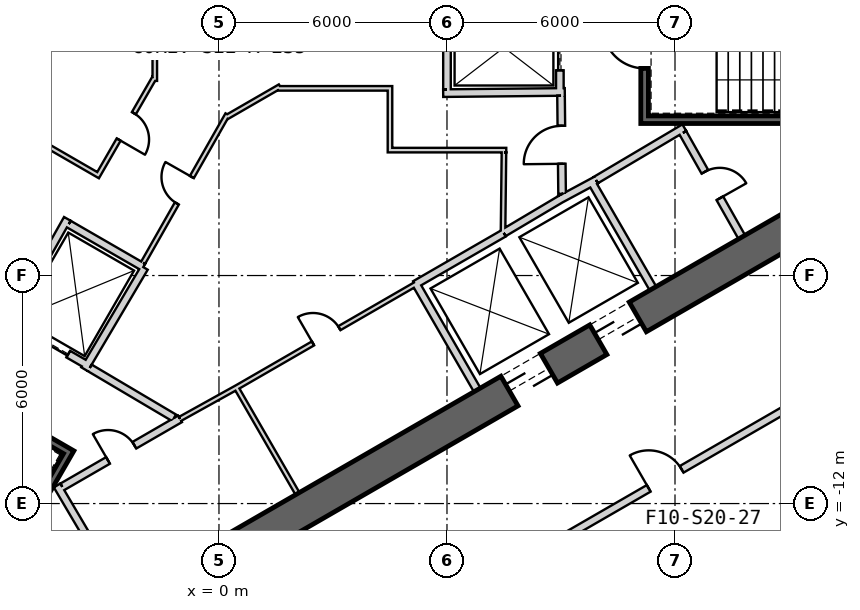
"""IFC4 building model, lengths in metres.
Left out: names, types, materials, properties, quantities, classifications, styles, units other than length and angle.
Written with IfcOpenShell. Run it as: python <this file> out.ifc"""

import sys

from ifc_helpers import new_model, si_unit, direction, frame, frame_2d, origin, place, context, subcontext, project, spatial, rectangle, extrude, element, fill, save


model = new_model("IFC4")
c1 = context("Model", 3, precision=1e-05, world=origin(), true_north=direction((0.0, 1.0)))
c2 = subcontext(c1, "Body", "Model", "MODEL_VIEW")
j1 = project(units=[si_unit("LENGTHUNIT", "METRE"), si_unit("PLANEANGLEUNIT", "RADIAN")], contexts=[c1])
p1 = place(None, origin())
s1 = spatial("IfcSite", under=j1, at=p1, CompositionType="ELEMENT")
p2 = place(p1, origin())
s2 = spatial("IfcBuilding", under=s1, at=p2, CompositionType="ELEMENT")
p3 = place(p2, frame((0.0, 0.0, 322.1)))
s3 = spatial("IfcBuildingStorey", under=s2, at=p3, CompositionType="ELEMENT", Elevation=322.1)
p4 = place(p3, frame((-7.825, -17.97, 0.0), z_axis=(0.0, 0.0, 1.0), x_axis=(0.866028369851, 0.499994862586, 0.0)))
e1 = element("IfcWall", 1, at=p4, inside=s3, PredefinedType="SHEAR", context=c2, shape_type="SweptSolid", body=[
    extrude(rectangle(XDim=31.523, YDim=0.9, at=frame_2d((15.762, 0.0))), origin(), (0.0, 0.0, 1.0), 3.9),
])
p5 = place(p4, frame((17.862, 0.0, 0.0)))
e2 = element("IfcOpeningElement", 2, at=p5, cuts=e1, PredefinedType="OPENING", context=c2, shape_type="SweptSolid", body=[
    extrude(rectangle(XDim=1.2, YDim=2.4, at=frame_2d((0.6, 1.2))), frame((0.0, 0.46, 0.0), z_axis=(0.0, -1.0, 0.0), x_axis=(1.0, 0.0, 0.0)), (0.0, 0.0, 1.0), 0.92),
])
p6 = place(p4, frame((20.562, 0.0, 0.0)))
e3 = element("IfcOpeningElement", 3, at=p6, cuts=e1, PredefinedType="OPENING", context=c2, shape_type="SweptSolid", body=[
    extrude(rectangle(XDim=1.2, YDim=2.4, at=frame_2d((0.6, 1.2))), frame((0.0, 0.46, 0.0), z_axis=(0.0, -1.0, 0.0), x_axis=(1.0, 0.0, 0.0)), (0.0, 0.0, 1.0), 0.92),
])
p7 = place(p4, frame((26.712, 0.0, 0.0)))
e4 = element("IfcOpeningElement", 4, at=p7, cuts=e1, PredefinedType="OPENING", context=c2, shape_type="SweptSolid", body=[
    extrude(rectangle(XDim=1.2, YDim=2.4, at=frame_2d((0.6, 1.2))), frame((0.0, 0.46, 0.0), z_axis=(0.0, -1.0, 0.0), x_axis=(1.0, 0.0, 0.0)), (0.0, 0.0, 1.0), 0.92),
])
p8 = place(p4, frame((3.612, 0.0, 0.0)))
e5 = element("IfcOpeningElement", 5, at=p8, cuts=e1, PredefinedType="OPENING", context=c2, shape_type="SweptSolid", body=[
    extrude(rectangle(XDim=1.2, YDim=2.4, at=frame_2d((0.6, 1.2))), frame((0.0, 0.46, 0.0), z_axis=(0.0, -1.0, 0.0), x_axis=(1.0, 0.0, 0.0)), (0.0, 0.0, 1.0), 0.92),
])
p9 = place(p3, frame((6.795, -9.01, 0.0), z_axis=(0.0, 0.0, 1.0), x_axis=(-0.499984717929, 0.866034226713, 0.0)))
e6 = element("IfcWall", 6, at=p9, inside=s3, PredefinedType="PLUMBINGWALL", context=c2, shape_type="SweptSolid", body=[
    extrude(rectangle(XDim=3.25, YDim=0.2, at=frame_2d((1.625, 0.0))), origin(), (0.0, 0.0, 1.0), 3.6),
])
p10 = place(p3, frame((5.159, -6.236, 0.0), z_axis=(0.0, 0.0, 1.0), x_axis=(0.866036505625, 0.499980770555, 0.0)))
e7 = element("IfcWall", 7, at=p10, inside=s3, PredefinedType="PLUMBINGWALL", context=c2, shape_type="SweptSolid", body=[
    extrude(rectangle(XDim=2.7, YDim=0.2, at=frame_2d((1.35, 0.0))), origin(), (0.0, 0.0, 1.0), 3.6),
])
p11 = place(p3, frame((9.795, -3.525, 0.0), z_axis=(0.0, 0.0, 1.0), x_axis=(0.499984717929, -0.866034226713, 0.0)))
e8 = element("IfcWall", 8, at=p11, inside=s3, PredefinedType="PLUMBINGWALL", context=c2, shape_type="SweptSolid", body=[
    extrude(rectangle(XDim=3.25, YDim=0.2, at=frame_2d((1.625, 0.0))), origin(), (0.0, 0.0, 1.0), 3.6),
])
p12 = place(p3, frame((8.974, -3.999, 0.0), z_axis=(0.0, 0.0, 1.0), x_axis=(0.880907015104, 0.473289373154, 0.0)))
e9 = element("IfcWall", 9, at=p12, inside=s3, PredefinedType="PLUMBINGWALL", context=c2, shape_type="SweptSolid", body=[
    extrude(rectangle(XDim=1.078, YDim=0.2, at=frame_2d((0.539, 0.0))), origin(), (0.0, 0.0, 1.0), 3.6),
])
p13 = place(p3, frame((7.493, -4.878, 0.0), z_axis=(0.0, 0.0, 1.0), x_axis=(0.859981807212, 0.510324691999, 0.0)))
e10 = element("IfcWall", 10, at=p13, inside=s3, PredefinedType="PLUMBINGWALL", context=c2, shape_type="SweptSolid", body=[
    extrude(rectangle(XDim=1.845, YDim=0.2, at=frame_2d((0.922, 0.0))), origin(), (0.0, 0.0, 1.0), 3.6),
])
p14 = place(p3, frame((11.1, -1.9, -0.3), z_axis=(0.0, 0.0, 1.0), x_axis=(1.0, 0.0, 0.0)))
e11 = element("IfcWall", 11, at=p14, inside=s3, PredefinedType="SHEAR", context=c2, shape_type="SweptSolid", body=[
    extrude(rectangle(XDim=7.9, YDim=0.2, at=frame_2d((3.95, 0.0))), origin(), (0.0, 0.0, 1.0), 3.9),
])
p15 = place(p3, frame((11.2, -1.8, -0.3), z_axis=(0.0, 0.0, 1.0), x_axis=(0.0, 1.0, 0.0)))
e12 = element("IfcWall", 12, at=p15, inside=s3, PredefinedType="SHEAR", context=c2, shape_type="SweptSolid", body=[
    extrude(rectangle(XDim=3.6, YDim=0.2, at=frame_2d((1.8, 0.0))), origin(), (0.0, 0.0, 1.0), 3.9),
])
p16 = place(p15, frame((1.25, 0.0, 0.3)))
e13 = element("IfcOpeningElement", 13, at=p16, cuts=e12, PredefinedType="OPENING", context=c2, shape_type="SweptSolid", body=[
    extrude(rectangle(XDim=1.1, YDim=2.1, at=frame_2d((0.55, 1.05))), frame((0.0, 0.11, 0.0), z_axis=(0.0, -1.0, 0.0), x_axis=(1.0, 0.0, 0.0)), (0.0, 0.0, 1.0), 0.22),
])
p17 = place(p3, frame((8.97, 1.2, 0.0), z_axis=(0.0, 0.0, 1.0), x_axis=(0.0, -1.0, 0.0)))
e14 = element("IfcWall", 14, at=p17, inside=s3, PredefinedType="PLUMBINGWALL", context=c2, shape_type="SweptSolid", body=[
    extrude(rectangle(XDim=2.4, YDim=0.2, at=frame_2d((1.2, 0.0))), origin(), (0.0, 0.0, 1.0), 3.6),
])
p18 = place(p17, frame((0.6, 0.0, 0.0)))
e15 = element("IfcOpeningElement", 15, at=p18, cuts=e14, PredefinedType="OPENING", context=c2, shape_type="SweptSolid", body=[
    extrude(rectangle(XDim=1.2, YDim=2.4, at=frame_2d((0.6, 1.2))), frame((0.0, 0.11, 0.0), z_axis=(0.0, -1.0, 0.0), x_axis=(1.0, 0.0, 0.0)), (0.0, 0.0, 1.0), 0.22),
])
p19 = place(p3, frame((5.9, -1.201, 0.0), z_axis=(0.0, 0.0, 1.0), x_axis=(0.999950064753, 0.009993397809, 0.0)))
e16 = element("IfcWall", 16, at=p19, inside=s3, PredefinedType="PLUMBINGWALL", context=c2, shape_type="SweptSolid", body=[
    extrude(rectangle(XDim=3.2, YDim=0.2, at=frame_2d((1.6, 0.0))), origin(), (0.0, 0.0, 1.0), 3.6),
])
p20 = place(p3, frame((6.0, -1.1, 0.0), z_axis=(0.0, 0.0, 1.0), x_axis=(0.0, 1.0, 0.0)))
e17 = element("IfcWall", 17, at=p20, inside=s3, PredefinedType="PLUMBINGWALL", context=c2, shape_type="SweptSolid", body=[
    extrude(rectangle(XDim=2.28, YDim=0.2, at=frame_2d((1.14, 0.0))), origin(), (0.0, 0.0, 1.0), 3.6),
])
p21 = place(p3, frame((-3.905, -10.563, -0.3), z_axis=(0.0, 0.0, 1.0), x_axis=(-0.500012932018, -0.866017937352, 0.0)))
e18 = element("IfcWall", 18, at=p21, inside=s3, PredefinedType="SHEAR", context=c2, shape_type="SweptSolid", body=[
    extrude(rectangle(XDim=8.1, YDim=0.2, at=frame_2d((4.05, 0.0))), origin(), (0.0, 0.0, 1.0), 3.9),
])
p22 = place(p3, frame((-4.041, -10.599, -0.3), z_axis=(0.0, 0.0, 1.0), x_axis=(-0.866047807691, 0.499961193289, 0.0)))
e19 = element("IfcWall", 19, at=p22, inside=s3, PredefinedType="SHEAR", context=c2, shape_type="SweptSolid", body=[
    extrude(rectangle(XDim=3.6, YDim=0.2, at=frame_2d((1.8, 0.0))), origin(), (0.0, 0.0, 1.0), 3.9),
])
p23 = place(p22, frame((1.25, 0.0, 0.3)))
e20 = element("IfcOpeningElement", 20, at=p23, cuts=e19, PredefinedType="OPENING", context=c2, shape_type="SweptSolid", body=[
    extrude(rectangle(XDim=1.1, YDim=2.1, at=frame_2d((0.55, 1.05))), frame((0.0, 0.11, 0.0), z_axis=(0.0, -1.0, 0.0), x_axis=(1.0, 0.0, 0.0)), (0.0, 0.0, 1.0), 0.22),
])
p24 = place(p3, frame((-3.446, -8.368, 0.0), z_axis=(0.0, 0.0, 1.0), x_axis=(-0.866024647952, 0.500001309137, 0.0)))
e21 = element("IfcWall", 21, at=p24, inside=s3, PredefinedType="PLUMBINGWALL", context=c2, shape_type="SweptSolid", body=[
    extrude(rectangle(XDim=2.4, YDim=0.2, at=frame_2d((1.2, 0.0))), origin(), (0.0, 0.0, 1.0), 3.6),
])
p25 = place(p24, frame((0.6, 0.0, 0.0)))
e22 = element("IfcOpeningElement", 22, at=p25, cuts=e21, PredefinedType="OPENING", context=c2, shape_type="SweptSolid", body=[
    extrude(rectangle(XDim=1.2, YDim=2.4, at=frame_2d((0.6, 1.2))), frame((0.0, 0.11, 0.0), z_axis=(0.0, -1.0, 0.0), x_axis=(1.0, 0.0, 0.0)), (0.0, 0.0, 1.0), 0.22),
])
p26 = place(p3, frame((-1.961, -5.796, 0.0), z_axis=(0.0, 0.0, 1.0), x_axis=(-0.508647062354, -0.860975125052, 0.0)))
e23 = element("IfcWall", 23, at=p26, inside=s3, PredefinedType="PLUMBINGWALL", context=c2, shape_type="SweptSolid", body=[
    extrude(rectangle(XDim=3.1, YDim=0.2, at=frame_2d((1.55, 0.0))), origin(), (0.0, 0.0, 1.0), 3.6),
])
p27 = place(p3, frame((-3.99, -4.509, 0.0), z_axis=(0.0, 0.0, 1.0), x_axis=(-0.491358283181, -0.870957540612, 0.0)))
e24 = element("IfcWall", 24, at=p27, inside=s3, PredefinedType="PLUMBINGWALL", context=c2, shape_type="SweptSolid", body=[
    extrude(rectangle(XDim=3.2, YDim=0.2, at=frame_2d((1.6, 0.0))), origin(), (0.0, 0.0, 1.0), 3.6),
])
p28 = place(p3, frame((-3.953, -4.646, 0.0), z_axis=(0.0, 0.0, 1.0), x_axis=(0.866065302921, -0.4999308863, 0.0)))
e25 = element("IfcWall", 25, at=p28, inside=s3, PredefinedType="PLUMBINGWALL", context=c2, shape_type="SweptSolid", body=[
    extrude(rectangle(XDim=2.264, YDim=0.2, at=frame_2d((1.132, 0.0))), origin(), (0.0, 0.0, 1.0), 3.6),
])
p29 = place(p3, frame((2.067, -11.74, 0.0), z_axis=(0.0, 0.0, 1.0), x_axis=(-0.499984717929, 0.866034226713, 0.0)))
e26 = element("IfcWall", 26, at=p29, inside=s3, PredefinedType="PARTITIONING", context=c2, shape_type="SweptSolid", body=[
    extrude(rectangle(XDim=3.25, YDim=0.12, at=frame_2d((1.625, 0.0))), origin(), (0.0, 0.0, 1.0), 3.6),
])
p30 = place(p3, frame((-4.26, -11.524, 0.0), z_axis=(0.0, 0.0, 1.0), x_axis=(0.507997497166, -0.861358544901, 0.0)))
e27 = element("IfcWall", 27, at=p30, inside=s3, PredefinedType="PARTITIONING", context=c2, shape_type="SweptSolid", body=[
    extrude(rectangle(XDim=3.35, YDim=0.2, at=frame_2d((1.675, 0.0))), origin(), (0.0, 0.0, 1.0), 3.6),
])
p31 = place(p3, frame((-1.024, -9.771, 0.0), z_axis=(0.0, 0.0, 1.0), x_axis=(-0.866029903013, -0.499992207027, 0.0)))
e28 = element("IfcWall", 28, at=p31, inside=s3, PredefinedType="PARTITIONING", context=c2, shape_type="SweptSolid", body=[
    extrude(rectangle(XDim=3.578, YDim=0.2, at=frame_2d((1.789, 0.0))), origin(), (0.0, 0.0, 1.0), 3.6),
])
p32 = place(p31, frame((1.389, 0.0, 0.0)))
e29 = element("IfcOpeningElement", 29, at=p32, cuts=e28, PredefinedType="OPENING", context=c2, shape_type="SweptSolid", body=[
    extrude(rectangle(XDim=0.8, YDim=2.1, at=frame_2d((0.4, 1.05))), frame((0.0, 0.11, 0.0), z_axis=(0.0, -1.0, 0.0), x_axis=(1.0, 0.0, 0.0)), (0.0, 0.0, 1.0), 0.22),
])
p33 = place(p3, frame((-1.023, -9.772, 0.0), z_axis=(0.0, 0.0, 1.0), x_axis=(0.874290944206, 0.485402250592, 0.0)))
e30 = element("IfcWall", 30, at=p33, inside=s3, PredefinedType="PARTITIONING", context=c2, shape_type="SweptSolid", body=[
    extrude(rectangle(XDim=1.723, YDim=0.12, at=frame_2d((0.861, 0.0))), origin(), (0.0, 0.0, 1.0), 3.6),
])
p34 = place(p3, frame((0.483, -8.936, 0.0), z_axis=(0.0, 0.0, 1.0), x_axis=(0.866028230842, 0.499995103361, 0.0)))
e31 = element("IfcWall", 31, at=p34, inside=s3, PredefinedType="PARTITIONING", context=c2, shape_type="SweptSolid", body=[
    extrude(rectangle(XDim=5.4, YDim=0.12, at=frame_2d((2.7, 0.0))), origin(), (0.0, 0.0, 1.0), 3.6),
])
p35 = place(p34, frame((2.3, 0.0, 0.0)))
e32 = element("IfcOpeningElement", 32, at=p35, cuts=e31, PredefinedType="OPENING", context=c2, shape_type="SweptSolid", body=[
    extrude(rectangle(XDim=0.8, YDim=2.1, at=frame_2d((0.4, 1.05))), frame((0.0, 0.07, 0.0), z_axis=(0.0, -1.0, 0.0), x_axis=(1.0, 0.0, 0.0)), (0.0, 0.0, 1.0), 0.14),
])
p36 = place(p3, frame((12.245, -2.109, 0.0), z_axis=(0.0, 0.0, 1.0), x_axis=(-0.860414880418, -0.509594185166, 0.0)))
e33 = element("IfcWall", 33, at=p36, inside=s3, PredefinedType="PARTITIONING", context=c2, shape_type="SweptSolid", body=[
    extrude(rectangle(XDim=2.7, YDim=0.2, at=frame_2d((1.35, 0.0))), origin(), (0.0, 0.0, 1.0), 3.6),
])
p37 = place(p3, frame((13.758, -4.99, 0.0), z_axis=(0.0, 0.0, 1.0), x_axis=(-0.491993409184, 0.87059892334, 0.0)))
e34 = element("IfcWall", 34, at=p37, inside=s3, PredefinedType="PARTITIONING", context=c2, shape_type="SweptSolid", body=[
    extrude(rectangle(XDim=3.15, YDim=0.2, at=frame_2d((1.575, 0.0))), origin(), (0.0, 0.0, 1.0), 3.6),
])
p38 = place(p37, frame((1.175, 0.0, 0.0)))
e35 = element("IfcOpeningElement", 35, at=p38, cuts=e34, PredefinedType="OPENING", context=c2, shape_type="SweptSolid", body=[
    extrude(rectangle(XDim=0.8, YDim=2.1, at=frame_2d((0.4, 1.05))), frame((0.0, 0.11, 0.0), z_axis=(0.0, -1.0, 0.0), x_axis=(1.0, 0.0, 0.0)), (0.0, 0.0, 1.0), 0.22),
])
p39 = place(p3, frame((9.029, -3.851, 0.0), z_axis=(0.0, 0.0, 1.0), x_axis=(-0.010783593937, 0.99994185536, 0.0)))
e36 = element("IfcWall", 36, at=p39, inside=s3, PredefinedType="PARTITIONING", context=c2, shape_type="SweptSolid", body=[
    extrude(rectangle(XDim=2.581, YDim=0.2, at=frame_2d((1.291, 0.0))), origin(), (0.0, 0.0, 1.0), 3.6),
])
p40 = place(p39, frame((0.791, 0.0, 0.0)))
e37 = element("IfcOpeningElement", 37, at=p40, cuts=e36, PredefinedType="OPENING", context=c2, shape_type="SweptSolid", body=[
    extrude(rectangle(XDim=1.0, YDim=2.1, at=frame_2d((0.5, 1.05))), frame((0.0, 0.11, 0.0), z_axis=(0.0, -1.0, 0.0), x_axis=(1.0, 0.0, 0.0)), (0.0, 0.0, 1.0), 0.22),
])
p41 = place(p3, frame((-3.401, -8.43, 0.0), z_axis=(0.0, 0.0, 1.0), x_axis=(0.860630814782, -0.509229418482, 0.0)))
e38 = element("IfcWall", 38, at=p41, inside=s3, PredefinedType="PARTITIONING", context=c2, shape_type="SweptSolid", body=[
    extrude(rectangle(XDim=2.582, YDim=0.2, at=frame_2d((1.291, 0.0))), origin(), (0.0, 0.0, 1.0), 3.6),
])
p42 = place(p3, frame((0.224, -1.761, 0.0), z_axis=(0.0, 0.0, 1.0), x_axis=(-0.494327216836, -0.869275907118, 0.0)))
e39 = element("IfcWall", 39, at=p42, inside=s3, PredefinedType="PARTITIONING", context=c2, shape_type="SweptSolid", body=[
    extrude(rectangle(XDim=4.487, YDim=0.12, at=frame_2d((2.244, 0.0))), origin(), (0.0, 0.0, 1.0), 3.6),
])
p43 = place(p42, frame((1.895, 0.0, 0.0)))
e40 = element("IfcOpeningElement", 40, at=p43, cuts=e39, PredefinedType="OPENING", context=c2, shape_type="SweptSolid", body=[
    extrude(rectangle(XDim=0.8, YDim=2.1, at=frame_2d((0.4, 1.05))), frame((0.0, 0.07, 0.0), z_axis=(0.0, -1.0, 0.0), x_axis=(1.0, 0.0, 0.0)), (0.0, 0.0, 1.0), 0.14),
])
p44 = place(p3, frame((1.605, -1.023, 0.0), z_axis=(0.0, 0.0, 1.0), x_axis=(-0.866001581989, -0.50004125829, 0.0)))
e41 = element("IfcWall", 41, at=p44, inside=s3, PredefinedType="PARTITIONING", context=c2, shape_type="SweptSolid", body=[
    extrude(rectangle(XDim=1.635, YDim=0.12, at=frame_2d((0.817, 0.0))), origin(), (0.0, 0.0, 1.0), 3.6),
])
p45 = place(p3, frame((4.56, -1.075, 0.0), z_axis=(0.0, 0.0, 1.0), x_axis=(-1.0, 0.0, 0.0)))
e42 = element("IfcWall", 42, at=p45, inside=s3, PredefinedType="PARTITIONING", context=c2, shape_type="SweptSolid", body=[
    extrude(rectangle(XDim=3.026, YDim=0.12, at=frame_2d((1.513, 0.0))), origin(), (0.0, 0.0, 1.0), 3.6),
])
p46 = place(p3, frame((4.5, -2.76, 0.0), z_axis=(0.0, 0.0, 1.0), x_axis=(0.0, 1.0, 0.0)))
e43 = element("IfcWall", 43, at=p46, inside=s3, PredefinedType="PARTITIONING", context=c2, shape_type="SweptSolid", body=[
    extrude(rectangle(XDim=1.625, YDim=0.12, at=frame_2d((0.812, 0.0))), origin(), (0.0, 0.0, 1.0), 3.6),
])
p47 = place(p3, frame((7.56, -2.7, 0.0), z_axis=(0.0, 0.0, 1.0), x_axis=(-1.0, 0.0, 0.0)))
e44 = element("IfcWall", 44, at=p47, inside=s3, PredefinedType="PARTITIONING", context=c2, shape_type="SweptSolid", body=[
    extrude(rectangle(XDim=3.0, YDim=0.12, at=frame_2d((1.5, 0.0))), origin(), (0.0, 0.0, 1.0), 3.6),
])
p48 = place(p3, frame((7.475, -4.865, 0.0), z_axis=(0.0, 0.0, 1.0), x_axis=(0.011716133148, 0.999931363757, 0.0)))
e45 = element("IfcWall", 45, at=p48, inside=s3, PredefinedType="PARTITIONING", context=c2, shape_type="SweptSolid", body=[
    extrude(rectangle(XDim=2.105, YDim=0.12, at=frame_2d((1.052, 0.0))), origin(), (0.0, 0.0, 1.0), 3.6),
])
p49 = place(p3, frame((-1.689, -0.879, 0.0), z_axis=(0.0, 0.0, 1.0), x_axis=(0.0, 1.0, 0.0)))
e46 = element("IfcWall", 46, at=p49, inside=s3, PredefinedType="PARTITIONING", context=c2, shape_type="SweptSolid", body=[
    extrude(rectangle(XDim=1.635, YDim=0.12, at=frame_2d((0.818, 0.0))), origin(), (0.0, 0.0, 1.0), 3.6),
])
p50 = place(p3, frame((-3.211, -3.412, 0.0), z_axis=(0.0, 0.0, 1.0), x_axis=(0.499983190554, 0.866035108505, 0.0)))
e47 = element("IfcWall", 47, at=p50, inside=s3, PredefinedType="PARTITIONING", context=c2, shape_type="SweptSolid", body=[
    extrude(rectangle(XDim=3.026, YDim=0.12, at=frame_2d((1.513, 0.0))), origin(), (0.0, 0.0, 1.0), 3.6),
])
p51 = place(p50, frame((1.143, 0.0, 0.0)))
e48 = element("IfcOpeningElement", 48, at=p51, cuts=e47, PredefinedType="OPENING", context=c2, shape_type="SweptSolid", body=[
    extrude(rectangle(XDim=0.8, YDim=2.1, at=frame_2d((0.4, 1.05))), frame((0.0, 0.07, 0.0), z_axis=(0.0, -1.0, 0.0), x_axis=(1.0, 0.0, 0.0)), (0.0, 0.0, 1.0), 0.14),
])
p52 = place(p3, frame((-4.64, -2.517, 0.0), z_axis=(0.0, 0.0, 1.0), x_axis=(0.866015446554, -0.500017246033, 0.0)))
e49 = element("IfcWall", 49, at=p52, inside=s3, PredefinedType="PARTITIONING", context=c2, shape_type="SweptSolid", body=[
    extrude(rectangle(XDim=1.625, YDim=0.12, at=frame_2d((0.812, 0.0))), origin(), (0.0, 0.0, 1.0), 3.6),
])
p53 = place(p3, frame((-6.505, -21.885, 0.0), z_axis=(0.0, 0.0, 1.0), x_axis=(0.86602457258, 0.500001439686, 0.0)))
e50 = element("IfcWall", 50, at=p53, inside=s3, PredefinedType="PARTITIONING", context=c2, shape_type="SweptSolid", body=[
    extrude(rectangle(XDim=32.952, YDim=0.2, at=frame_2d((16.476, 0.0))), origin(), (0.0, 0.0, 1.0), 2.97),
])
p54 = place(p53, frame((20.569, 0.0, 0.0)))
e51 = element("IfcOpeningElement", 51, at=p54, cuts=e50, PredefinedType="OPENING", context=c2, shape_type="SweptSolid", body=[
    extrude(rectangle(XDim=1.0, YDim=2.1, at=frame_2d((0.5, 1.05))), frame((0.0, 0.11, 0.0), z_axis=(0.0, -1.0, 0.0), x_axis=(1.0, 0.0, 0.0)), (0.0, 0.0, 1.0), 0.22),
])
p55 = place(p53, frame((4.143, 0.0, 0.0)))
e52 = element("IfcOpeningElement", 52, at=p55, cuts=e50, PredefinedType="OPENING", context=c2, shape_type="SweptSolid", body=[
    extrude(rectangle(XDim=1.0, YDim=2.1, at=frame_2d((0.5, 1.05))), frame((0.0, 0.11, 0.0), z_axis=(0.0, -1.0, 0.0), x_axis=(1.0, 0.0, 0.0)), (0.0, 0.0, 1.0), 0.22),
])
p56 = place(p16, origin())
e53 = element("IfcDoor", 53, at=p56, inside=s3, OperationType="SINGLE_SWING_LEFT", PredefinedType="USERDEFINED", context=c2, shape_type="SweptSolid", body=[
    extrude(rectangle(XDim=1.1, YDim=2.1, at=frame_2d((0.55, 1.05))), frame((0.0, 0.025, 0.0), z_axis=(0.0, -1.0, 0.0), x_axis=(1.0, 0.0, 0.0)), (0.0, 0.0, 1.0), 0.05),
])
fill(e13, e53)
p57 = place(p40, origin())
e54 = element("IfcDoor", 54, at=p57, inside=s3, OperationType="SINGLE_SWING_RIGHT", PredefinedType="USERDEFINED", context=c2, shape_type="SweptSolid", body=[
    extrude(rectangle(XDim=1.0, YDim=2.1, at=frame_2d((0.5, 1.05))), frame((0.0, 0.025, 0.0), z_axis=(0.0, -1.0, 0.0), x_axis=(1.0, 0.0, 0.0)), (0.0, 0.0, 1.0), 0.05),
])
fill(e37, e54)
p58 = place(p18, origin())
e55 = element("IfcDoor", 55, at=p58, inside=s3, OperationType="SLIDING_TO_LEFT", PredefinedType="USERDEFINED", context=c2, shape_type="SweptSolid", body=[
    extrude(rectangle(XDim=1.2, YDim=2.4, at=frame_2d((0.6, 1.2))), frame((0.0, 0.025, 0.0), z_axis=(0.0, -1.0, 0.0), x_axis=(1.0, 0.0, 0.0)), (0.0, 0.0, 1.0), 0.05),
])
fill(e15, e55)
p59 = place(p25, origin())
e56 = element("IfcDoor", 56, at=p59, inside=s3, OperationType="SLIDING_TO_LEFT", PredefinedType="USERDEFINED", context=c2, shape_type="SweptSolid", body=[
    extrude(rectangle(XDim=1.2, YDim=2.4, at=frame_2d((0.6, 1.2))), frame((0.0, 0.025, 0.0), z_axis=(0.0, -1.0, 0.0), x_axis=(1.0, 0.0, 0.0)), (0.0, 0.0, 1.0), 0.05),
])
fill(e22, e56)
p60 = place(p43, origin())
e57 = element("IfcDoor", 57, at=p60, inside=s3, OperationType="SINGLE_SWING_RIGHT", PredefinedType="USERDEFINED", context=c2, shape_type="SweptSolid", body=[
    extrude(rectangle(XDim=0.8, YDim=2.1, at=frame_2d((0.4, 1.05))), frame((0.0, 0.025, 0.0), z_axis=(0.0, -1.0, 0.0), x_axis=(1.0, 0.0, 0.0)), (0.0, 0.0, 1.0), 0.05),
])
fill(e40, e57)
p61 = place(p51, origin())
e58 = element("IfcDoor", 58, at=p61, inside=s3, OperationType="SINGLE_SWING_LEFT", PredefinedType="USERDEFINED", context=c2, shape_type="SweptSolid", body=[
    extrude(rectangle(XDim=0.8, YDim=2.1, at=frame_2d((0.4, 1.05))), frame((0.0, 0.025, 0.0), z_axis=(0.0, -1.0, 0.0), x_axis=(1.0, 0.0, 0.0)), (0.0, 0.0, 1.0), 0.05),
])
fill(e48, e58)
p62 = place(p32, origin())
e59 = element("IfcDoor", 59, at=p62, inside=s3, OperationType="SINGLE_SWING_LEFT", PredefinedType="USERDEFINED", context=c2, shape_type="SweptSolid", body=[
    extrude(rectangle(XDim=0.8, YDim=2.1, at=frame_2d((0.4, 1.05))), frame((0.0, 0.025, 0.0), z_axis=(0.0, -1.0, 0.0), x_axis=(1.0, 0.0, 0.0)), (0.0, 0.0, 1.0), 0.05),
])
fill(e29, e59)
p63 = place(p35, origin())
e60 = element("IfcDoor", 60, at=p63, inside=s3, OperationType="SINGLE_SWING_LEFT", PredefinedType="USERDEFINED", context=c2, shape_type="SweptSolid", body=[
    extrude(rectangle(XDim=0.8, YDim=2.1, at=frame_2d((0.4, 1.05))), frame((0.0, 0.025, 0.0), z_axis=(0.0, -1.0, 0.0), x_axis=(1.0, 0.0, 0.0)), (0.0, 0.0, 1.0), 0.05),
])
fill(e32, e60)
p64 = place(p38, origin())
e61 = element("IfcDoor", 61, at=p64, inside=s3, OperationType="SINGLE_SWING_LEFT", PredefinedType="USERDEFINED", context=c2, shape_type="SweptSolid", body=[
    extrude(rectangle(XDim=0.8, YDim=2.1, at=frame_2d((0.4, 1.05))), frame((0.0, 0.025, 0.0), z_axis=(0.0, -1.0, 0.0), x_axis=(1.0, 0.0, 0.0)), (0.0, 0.0, 1.0), 0.05),
])
fill(e35, e61)
p65 = place(p54, origin())
e62 = element("IfcDoor", 62, at=p65, inside=s3, OperationType="SINGLE_SWING_RIGHT", PredefinedType="USERDEFINED", context=c2, shape_type="SweptSolid", body=[
    extrude(rectangle(XDim=1.0, YDim=2.1, at=frame_2d((0.5, 1.05))), frame((0.0, 0.025, 0.0), z_axis=(0.0, -1.0, 0.0), x_axis=(1.0, 0.0, 0.0)), (0.0, 0.0, 1.0), 0.05),
])
fill(e51, e62)
p66 = place(p5, origin())
e63 = element("IfcDoor", 63, at=p66, inside=s3, OperationType="SLIDING_TO_LEFT", PredefinedType="USERDEFINED", context=c2, shape_type="SweptSolid", body=[
    extrude(rectangle(XDim=1.2, YDim=2.4, at=frame_2d((0.6, 1.2))), frame((0.0, 0.025, 0.0), z_axis=(0.0, -1.0, 0.0), x_axis=(1.0, 0.0, 0.0)), (0.0, 0.0, 1.0), 0.05),
])
fill(e2, e63)
p67 = place(p6, origin())
e64 = element("IfcDoor", 64, at=p67, inside=s3, OperationType="SLIDING_TO_LEFT", PredefinedType="USERDEFINED", context=c2, shape_type="SweptSolid", body=[
    extrude(rectangle(XDim=1.2, YDim=2.4, at=frame_2d((0.6, 1.2))), frame((0.0, 0.025, 0.0), z_axis=(0.0, -1.0, 0.0), x_axis=(1.0, 0.0, 0.0)), (0.0, 0.0, 1.0), 0.05),
])
fill(e3, e64)
save(model, sys.argv[1])
